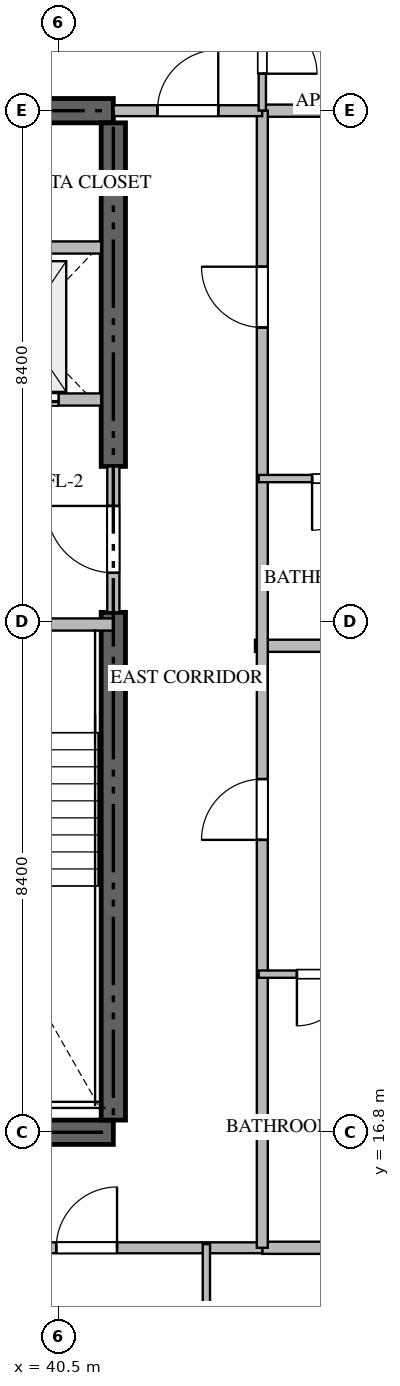
"""IFC4 building model, lengths in metres.
Left out: names, types, materials, properties, quantities, classifications, styles, units other than length and angle.
Written with IfcOpenShell. Run it as: python <this file> out.ifc"""

import sys

from ifc_helpers import new_model, si_unit, direction, frame, frame_2d, origin, place, context, subcontext, project, spatial, rectangle, extrude, source, transform, mapped, element, fill, save


model = new_model("IFC4")
c1 = context("Model", 3, precision=1e-05, world=origin(), true_north=direction((0.0, 1.0)))
c2 = subcontext(c1, "Body", "Model", "MODEL_VIEW")
j1 = project(units=[si_unit("LENGTHUNIT", "METRE"), si_unit("PLANEANGLEUNIT", "RADIAN")], contexts=[c1])
p1 = place(None, origin())
s1 = spatial("IfcSite", under=j1, at=p1, CompositionType="ELEMENT")
p2 = place(p1, origin())
s2 = spatial("IfcBuilding", under=s1, at=p2, CompositionType="ELEMENT")
p3 = place(p2, frame((0.0, 0.0, 131.4)))
s3 = spatial("IfcBuildingStorey", under=s2, at=p3, CompositionType="ELEMENT", Elevation=131.4)
for number, where, z_axis, x_axis in (
    (1, (23.4, 16.8, -0.26), (0.0, 0.0, 1.0), (1.0, 0.0, 0.0)),
    (2, (41.4, 33.6, -0.26), (0.0, 0.0, 1.0), (-1.0, 0.0, 0.0)),
):
    element("IfcWall", number, at=place(p3, frame(where, z_axis=z_axis, x_axis=x_axis)), inside=s3, PredefinedType="SHEAR", context=c2, shape_type="SweptSolid", body=[
        extrude(rectangle(XDim=18.0, YDim=0.4, at=frame_2d((9.0, 0.0))), origin(), (0.0, 0.0, 1.0), 3.748),
    ])
p4 = place(p3, frame((41.4, 17.0, -0.26), z_axis=(0.0, 0.0, 1.0), x_axis=(0.0, 1.0, 0.0)))
e3 = element("IfcWall", 3, at=p4, inside=s3, PredefinedType="SHEAR", context=c2, shape_type="SweptSolid", body=[
    extrude(rectangle(XDim=8.35, YDim=0.4, at=frame_2d((4.175, 0.0))), origin(), (0.0, 0.0, 1.0), 3.748),
])
p5 = place(p3, frame((41.4, 27.75, -0.26), z_axis=(0.0, 0.0, 1.0), x_axis=(0.0, 1.0, 0.0)))
e4 = element("IfcWall", 4, at=p5, inside=s3, PredefinedType="SHEAR", context=c2, shape_type="SweptSolid", body=[
    extrude(rectangle(XDim=5.65, YDim=0.4, at=frame_2d((2.825, 0.0))), origin(), (0.0, 0.0, 1.0), 3.748),
])
p6 = place(p3, frame((36.95, 25.15, 0.0), z_axis=(0.0, 0.0, 1.0), x_axis=(1.0, 0.0, 0.0)))
e5 = element("IfcWall", 5, at=p6, inside=s3, PredefinedType="STANDARD", context=c2, shape_type="SweptSolid", body=[
    extrude(rectangle(XDim=4.45, YDim=0.2, at=frame_2d((2.225, 0.0))), origin(), (0.0, 0.0, 1.0), 3.49),
])
p7 = place(p6, frame((1.65, 0.0, 0.0)))
e6 = element("IfcOpeningElement", 6, at=p7, cuts=e5, PredefinedType="OPENING", context=c2, shape_type="SweptSolid", body=[
    extrude(rectangle(XDim=1.1, YDim=2.15, at=frame_2d((0.55, 1.075))), frame((0.0, 0.11, 0.0), z_axis=(0.0, -1.0, 0.0), x_axis=(1.0, 0.0, 0.0)), (0.0, 0.0, 1.0), 0.22),
])
p8 = place(p3, frame((38.75, 28.85, 0.0), z_axis=(0.0, 0.0, 1.0), x_axis=(1.0, 0.0, 0.0)))
e7 = element("IfcWall", 7, at=p8, inside=s3, PredefinedType="STANDARD", context=c2, shape_type="SweptSolid", body=[
    extrude(rectangle(XDim=2.45, YDim=0.2, at=frame_2d((1.225, 0.0))), origin(), (0.0, 0.0, 1.0), 3.49),
])
p9 = place(p8, frame((0.55, 0.0, 0.0)))
e8 = element("IfcOpeningElement", 8, at=p9, cuts=e7, PredefinedType="OPENING", context=c2, shape_type="SweptSolid", body=[
    extrude(rectangle(XDim=1.2, YDim=2.2, at=frame_2d((0.6, 1.1))), frame((0.0, 0.11, 0.0), z_axis=(0.0, -1.0, 0.0), x_axis=(1.0, 0.0, 0.0)), (0.0, 0.0, 1.0), 0.22),
])
p10 = place(p3, frame((38.75, 31.35, 0.0), z_axis=(0.0, 0.0, 1.0), x_axis=(1.0, 0.0, 0.0)))
e9 = element("IfcWall", 9, at=p10, inside=s3, PredefinedType="STANDARD", context=c2, shape_type="SweptSolid", body=[
    extrude(rectangle(XDim=2.45, YDim=0.2, at=frame_2d((1.225, 0.0))), origin(), (0.0, 0.0, 1.0), 3.49),
])
p11 = place(p3, frame((41.4, 25.352, 0.0), z_axis=(0.0, 0.0, 1.0), x_axis=(0.0, 1.0, 0.0)))
e10 = element("IfcWall", 10, at=p11, inside=s3, PredefinedType="STANDARD", context=c2, shape_type="SweptSolid", body=[
    extrude(rectangle(XDim=2.396, YDim=0.2, at=frame_2d((1.198, 0.0))), origin(), (0.0, 0.0, 1.0), 3.49),
])
p12 = place(p11, frame((0.648, 0.0, 0.0)))
e11 = element("IfcOpeningElement", 11, at=p12, cuts=e10, PredefinedType="OPENING", context=c2, shape_type="SweptSolid", body=[
    extrude(rectangle(XDim=1.1, YDim=2.15, at=frame_2d((0.55, 1.075))), frame((0.0, 0.11, 0.0), z_axis=(0.0, -1.0, 0.0), x_axis=(1.0, 0.0, 0.0)), (0.0, 0.0, 1.0), 0.22),
])
p13 = place(p3, frame((43.73, 24.8, 0.0), z_axis=(0.0, 0.0, 1.0), x_axis=(1.0, 0.0, 0.0)))
e12 = element("IfcWall", 12, at=p13, inside=s3, PredefinedType="PARTITIONING", context=c2, shape_type="SweptSolid", body=[
    extrude(rectangle(XDim=13.188, YDim=0.2, at=frame_2d((6.594, 0.0))), origin(), (0.0, 0.0, 1.0), 3.49),
])
for number, where, z_axis, x_axis in (
    (13, (43.85, 14.9, 0.0), (0.0, 0.0, 1.0), (1.0, 0.0, 0.0)),
    (14, (43.85, 33.6, 0.0), (0.0, 0.0, 1.0), (1.0, 0.0, 0.0)),
):
    element("IfcWall", number, at=place(p3, frame(where, z_axis=z_axis, x_axis=x_axis)), inside=s3, PredefinedType="PARTITIONING", context=c2, shape_type="SweptSolid", body=[
        extrude(rectangle(XDim=13.068, YDim=0.2, at=frame_2d((6.534, 0.0))), origin(), (0.0, 0.0, 1.0), 3.49),
    ])
p14 = place(p3, frame((20.952, 14.9, 0.0), z_axis=(0.0, 0.0, 1.0), x_axis=(1.0, 0.0, 0.0)))
e15 = element("IfcWall", 15, at=p14, inside=s3, PredefinedType="PARTITIONING", context=c2, shape_type="SweptSolid", body=[
    extrude(rectangle(XDim=22.896, YDim=0.18, at=frame_2d((11.448, 0.0))), origin(), (0.0, 0.0, 1.0), 3.49),
])
p15 = place(p14, frame((2.19, 0.0, 0.0)))
e16 = element("IfcOpeningElement", 16, at=p15, cuts=e15, PredefinedType="OPENING", context=c2, shape_type="SweptSolid", body=[
    extrude(rectangle(XDim=1.0, YDim=2.15, at=frame_2d((0.5, 1.075))), frame((0.0, 0.1, 0.0), z_axis=(0.0, -1.0, 0.0), x_axis=(1.0, 0.0, 0.0)), (0.0, 0.0, 1.0), 0.2),
])
p16 = place(p14, frame((14.955, 0.0, 0.0)))
e17 = element("IfcOpeningElement", 17, at=p16, cuts=e15, PredefinedType="OPENING", context=c2, shape_type="SweptSolid", body=[
    extrude(rectangle(XDim=1.0, YDim=2.15, at=frame_2d((0.5, 1.075))), frame((0.0, 0.1, 0.0), z_axis=(0.0, -1.0, 0.0), x_axis=(1.0, 0.0, 0.0)), (0.0, 0.0, 1.0), 0.2),
])
p17 = place(p14, frame((19.509, 0.0, 0.0)))
e18 = element("IfcOpeningElement", 18, at=p17, cuts=e15, PredefinedType="OPENING", context=c2, shape_type="SweptSolid", body=[
    extrude(rectangle(XDim=1.0, YDim=2.15, at=frame_2d((0.5, 1.075))), frame((0.0, 0.1, 0.0), z_axis=(0.0, -1.0, 0.0), x_axis=(1.0, 0.0, 0.0)), (0.0, 0.0, 1.0), 0.2),
])
p18 = place(p3, frame((43.85, 14.9, 0.0), z_axis=(0.0, 0.0, 1.0), x_axis=(0.0, 1.0, 0.0)))
e19 = element("IfcWall", 19, at=p18, inside=s3, PredefinedType="PARTITIONING", context=c2, shape_type="SweptSolid", body=[
    extrude(rectangle(XDim=18.7, YDim=0.18, at=frame_2d((9.35, 0.0))), origin(), (0.0, 0.0, 1.0), 3.49),
])
p19 = place(p18, frame((6.708, 0.0, 0.0)))
e20 = element("IfcOpeningElement", 20, at=p19, cuts=e19, PredefinedType="OPENING", context=c2, shape_type="SweptSolid", body=[
    extrude(rectangle(XDim=1.0, YDim=2.15, at=frame_2d((0.5, 1.075))), frame((0.0, 0.1, 0.0), z_axis=(0.0, -1.0, 0.0), x_axis=(1.0, 0.0, 0.0)), (0.0, 0.0, 1.0), 0.2),
])
p20 = place(p18, frame((15.134, 0.0, 0.0)))
e21 = element("IfcOpeningElement", 21, at=p20, cuts=e19, PredefinedType="OPENING", context=c2, shape_type="SweptSolid", body=[
    extrude(rectangle(XDim=1.0, YDim=2.15, at=frame_2d((0.5, 1.075))), frame((0.0, 0.1, 0.0), z_axis=(0.0, -1.0, 0.0), x_axis=(1.0, 0.0, 0.0)), (0.0, 0.0, 1.0), 0.2),
])
p21 = place(p3, frame((41.402, 33.6, 0.0), z_axis=(0.0, 0.0, 1.0), x_axis=(1.0, 0.0, 0.0)))
e22 = element("IfcWall", 22, at=p21, inside=s3, PredefinedType="PARTITIONING", context=c2, shape_type="SweptSolid", body=[
    extrude(rectangle(XDim=2.446, YDim=0.18, at=frame_2d((1.223, 0.0))), origin(), (0.0, 0.0, 1.0), 3.49),
])
p22 = place(p21, frame((0.723, 0.0, 0.0)))
e23 = element("IfcOpeningElement", 23, at=p22, cuts=e22, PredefinedType="OPENING", context=c2, shape_type="SweptSolid", body=[
    extrude(rectangle(XDim=1.0, YDim=2.15, at=frame_2d((0.5, 1.075))), frame((0.0, 0.1, 0.0), z_axis=(0.0, -1.0, 0.0), x_axis=(1.0, 0.0, 0.0)), (0.0, 0.0, 1.0), 0.2),
])
p23 = place(p3, frame((42.93, 12.15, 0.0), z_axis=(0.0, 0.0, 1.0), x_axis=(0.0, 1.0, 0.0)))
e24 = element("IfcWall", 24, at=p23, inside=s3, PredefinedType="PARTITIONING", context=c2, shape_type="SweptSolid", body=[
    extrude(rectangle(XDim=2.81, YDim=0.12, at=frame_2d((1.405, 0.0))), origin(), (0.0, 0.0, 1.0), 3.49),
])
p24 = place(p3, frame((43.85, 35.75, 0.0), z_axis=(0.0, 0.0, 1.0), x_axis=(0.0, -1.0, 0.0)))
e25 = element("IfcWall", 25, at=p24, inside=s3, PredefinedType="PARTITIONING", context=c2, shape_type="SweptSolid", body=[
    extrude(rectangle(XDim=2.148, YDim=0.12, at=frame_2d((1.074, 0.0))), origin(), (0.0, 0.0, 1.0), 3.49),
])
p25 = place(p24, frame((0.642, 0.0, 0.0)))
e26 = element("IfcOpeningElement", 26, at=p25, cuts=e25, PredefinedType="OPENING", context=c2, shape_type="SweptSolid", body=[
    extrude(rectangle(XDim=0.9, YDim=2.1, at=frame_2d((0.45, 1.05))), frame((0.0, 0.07, 0.0), z_axis=(0.0, -1.0, 0.0), x_axis=(1.0, 0.0, 0.0)), (0.0, 0.0, 1.0), 0.14),
])
p26 = place(p3, frame((45.898, 19.4, 0.0), z_axis=(0.0, 0.0, 1.0), x_axis=(-1.0, 0.0, 0.0)))
e27 = element("IfcWall", 27, at=p26, inside=s3, PredefinedType="PARTITIONING", context=c2, shape_type="SweptSolid", body=[
    extrude(rectangle(XDim=2.108, YDim=0.12, at=frame_2d((1.054, 0.0))), origin(), (0.0, 0.0, 1.0), 3.49),
])
p27 = place(p26, frame((0.629, 0.0, 0.0)))
e28 = element("IfcOpeningElement", 28, at=p27, cuts=e27, PredefinedType="OPENING", context=c2, shape_type="SweptSolid", body=[
    extrude(rectangle(XDim=0.85, YDim=2.1, at=frame_2d((0.425, 1.05))), frame((0.0, 0.07, 0.0), z_axis=(0.0, -1.0, 0.0), x_axis=(1.0, 0.0, 0.0)), (0.0, 0.0, 1.0), 0.14),
])
p28 = place(p3, frame((46.398, 27.55, 0.0), z_axis=(0.0, 0.0, 1.0), x_axis=(-1.0, 0.0, 0.0)))
e29 = element("IfcWall", 29, at=p28, inside=s3, PredefinedType="PARTITIONING", context=c2, shape_type="SweptSolid", body=[
    extrude(rectangle(XDim=2.608, YDim=0.12, at=frame_2d((1.304, 0.0))), origin(), (0.0, 0.0, 1.0), 3.49),
])
p29 = place(p28, frame((0.879, 0.0, 0.0)))
e30 = element("IfcOpeningElement", 30, at=p29, cuts=e29, PredefinedType="OPENING", context=c2, shape_type="SweptSolid", body=[
    extrude(rectangle(XDim=0.85, YDim=2.1, at=frame_2d((0.425, 1.05))), frame((0.0, 0.07, 0.0), z_axis=(0.0, -1.0, 0.0), x_axis=(1.0, 0.0, 0.0)), (0.0, 0.0, 1.0), 0.14),
])
m1 = source(origin(), c2, "Body", "SweptSolid", [
    extrude(rectangle(XDim=1.2, YDim=2.2, at=frame_2d((0.6, 1.1))), frame((0.0, 0.025, 0.0), z_axis=(0.0, -1.0, 0.0), x_axis=(1.0, 0.0, 0.0)), (0.0, 0.0, 1.0), 0.05),
])
p30 = place(p9, origin())
e31 = element("IfcDoor", 31, at=p30, inside=s3, OperationType="DOUBLE_DOOR_SLIDING", PredefinedType="DOOR", context=c2, shape_type="MappedRepresentation", body=[
    mapped(m1, transform((0.0, 0.0, 0.0), scale=1.0)),
])
fill(e8, e31)
m2 = source(origin(), c2, "Body", "SweptSolid", [
    extrude(rectangle(XDim=1.1, YDim=2.15, at=frame_2d((0.55, 1.075))), frame((0.0, 0.025, 0.0), z_axis=(0.0, -1.0, 0.0), x_axis=(1.0, 0.0, 0.0)), (0.0, 0.0, 1.0), 0.05),
])
p31 = place(p12, origin())
e32 = element("IfcDoor", 32, at=p31, inside=s3, OperationType="SINGLE_SWING_RIGHT", PredefinedType="DOOR", context=c2, shape_type="MappedRepresentation", body=[
    mapped(m2, transform((0.0, 0.0, 0.0), scale=1.0)),
])
fill(e11, e32)
m3 = source(origin(), c2, "Body", "SweptSolid", [
    extrude(rectangle(XDim=1.0, YDim=2.15, at=frame_2d((0.5, 1.075))), frame((0.0, 0.025, 0.0), z_axis=(0.0, -1.0, 0.0), x_axis=(1.0, 0.0, 0.0)), (0.0, 0.0, 1.0), 0.05),
])
p32 = place(p17, origin())
e33 = element("IfcDoor", 33, at=p32, inside=s3, OperationType="SINGLE_SWING_RIGHT", PredefinedType="DOOR", context=c2, shape_type="MappedRepresentation", body=[
    mapped(m3, transform((0.0, 0.0, 0.0), scale=1.0)),
])
fill(e18, e33)
p33 = place(p19, origin())
e34 = element("IfcDoor", 34, at=p33, inside=s3, OperationType="SINGLE_SWING_LEFT", PredefinedType="DOOR", context=c2, shape_type="MappedRepresentation", body=[
    mapped(m3, transform((0.0, 0.0, 0.0), scale=1.0)),
])
fill(e20, e34)
p34 = place(p20, origin())
e35 = element("IfcDoor", 35, at=p34, inside=s3, OperationType="SINGLE_SWING_RIGHT", PredefinedType="DOOR", context=c2, shape_type="MappedRepresentation", body=[
    mapped(m3, transform((0.0, 0.0, 0.0), scale=1.0)),
])
fill(e21, e35)
p35 = place(p22, origin())
e36 = element("IfcDoor", 36, at=p35, inside=s3, OperationType="SINGLE_SWING_RIGHT", PredefinedType="DOOR", context=c2, shape_type="MappedRepresentation", body=[
    mapped(m3, transform((0.0, 0.0, 0.0), scale=1.0)),
])
fill(e23, e36)
m4 = source(origin(), c2, "Body", "SweptSolid", [
    extrude(rectangle(XDim=0.9, YDim=2.1, at=frame_2d((0.45, 1.05))), frame((0.0, 0.025, 0.0), z_axis=(0.0, -1.0, 0.0), x_axis=(1.0, 0.0, 0.0)), (0.0, 0.0, 1.0), 0.05),
])
p36 = place(p25, origin())
e37 = element("IfcDoor", 37, at=p36, inside=s3, OperationType="SINGLE_SWING_RIGHT", PredefinedType="DOOR", context=c2, shape_type="MappedRepresentation", body=[
    mapped(m4, transform((0.0, 0.0, 0.0), scale=1.0)),
])
fill(e26, e37)
m5 = source(origin(), c2, "Body", "SweptSolid", [
    extrude(rectangle(XDim=0.85, YDim=2.1, at=frame_2d((0.425, 1.05))), frame((0.0, 0.025, 0.0), z_axis=(0.0, -1.0, 0.0), x_axis=(1.0, 0.0, 0.0)), (0.0, 0.0, 1.0), 0.05),
])
p37 = place(p27, origin())
e38 = element("IfcDoor", 38, at=p37, inside=s3, OperationType="SINGLE_SWING_RIGHT", PredefinedType="DOOR", context=c2, shape_type="MappedRepresentation", body=[
    mapped(m5, transform((0.0, 0.0, 0.0), scale=1.0)),
])
fill(e28, e38)
p38 = place(p29, origin())
e39 = element("IfcDoor", 39, at=p38, inside=s3, OperationType="SINGLE_SWING_RIGHT", PredefinedType="DOOR", context=c2, shape_type="MappedRepresentation", body=[
    mapped(m5, transform((0.0, 0.0, 0.0), scale=1.0)),
])
fill(e30, e39)
save(model, sys.argv[1])
